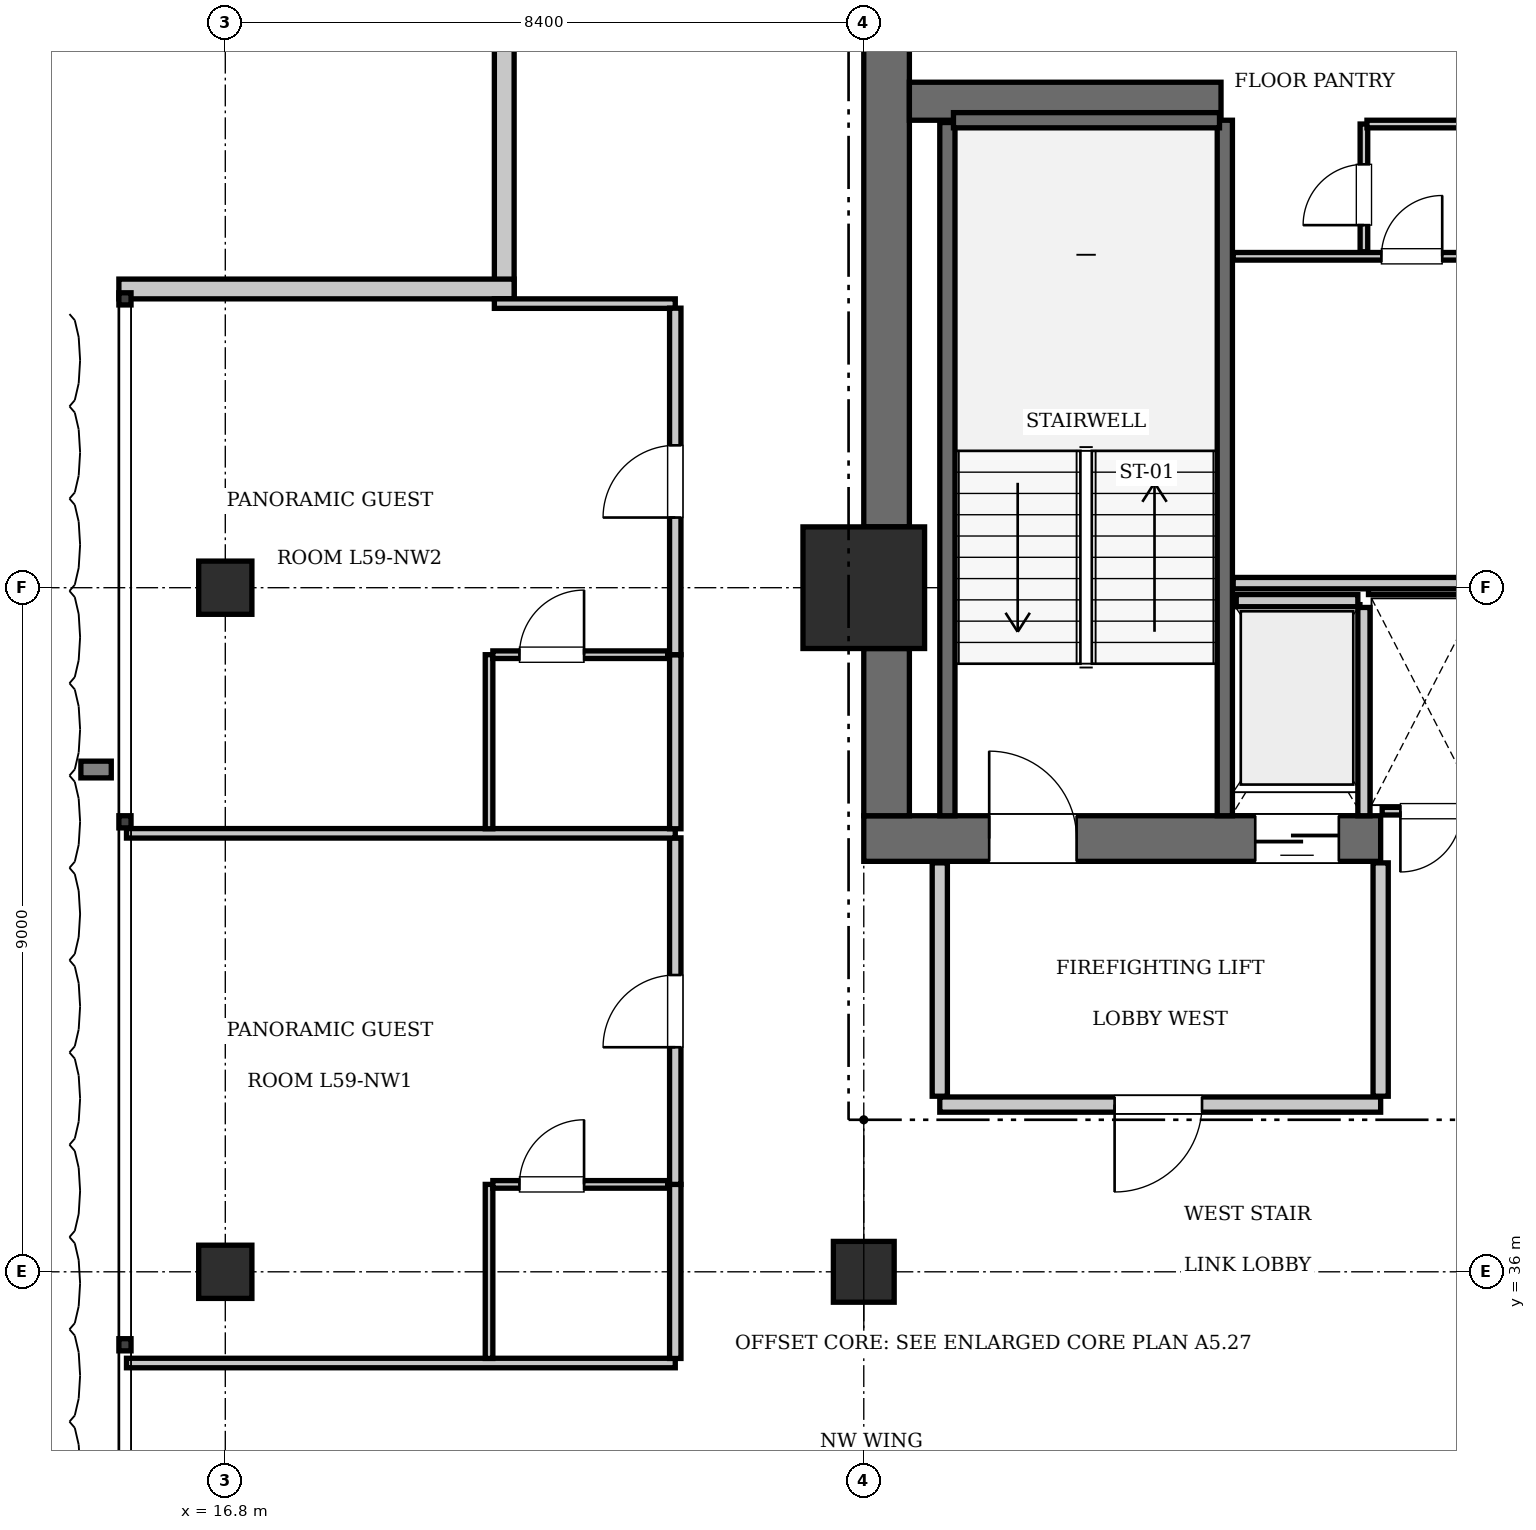
"""IFC4 building model, lengths in metres.
Left out: names, types, materials, properties, quantities, classifications, styles, units other than length and angle.
Written with IfcOpenShell. Run it as: python <this file> out.ifc"""

import sys

from ifc_helpers import new_model, si_unit, direction, frame, frame_2d, origin, origin_2d, place, context, subcontext, project, spatial, rectangle, extrude, element, fill, save


model = new_model("IFC4")
c1 = context("Model", 3, precision=1e-05, world=origin(), true_north=direction((0.0, 1.0)))
c2 = subcontext(c1, "Body", "Model", "MODEL_VIEW")
j1 = project(units=[si_unit("LENGTHUNIT", "METRE"), si_unit("PLANEANGLEUNIT", "RADIAN")], contexts=[c1])
p1 = place(None, origin())
s1 = spatial("IfcSite", under=j1, at=p1, CompositionType="ELEMENT")
p2 = place(p1, origin())
s2 = spatial("IfcBuilding", under=s1, at=p2, CompositionType="ELEMENT")
p3 = place(p2, frame((0.0, 0.0, 243.25)))
s3 = spatial("IfcBuildingStorey", under=s2, at=p3, CompositionType="ELEMENT", Elevation=243.25)
p4 = place(p3, frame((25.2, 45.0, 0.0), z_axis=(0.0, 0.0, 1.0), x_axis=(1.0, 0.0, 0.0)))
e1 = element("IfcColumn", 1, at=p4, inside=s3, PredefinedType="COLUMN", context=c2, shape_type="SweptSolid", body=[
    extrude(rectangle(XDim=1.6, YDim=1.6, at=origin_2d()), origin(), (0.0, 0.0, 1.0), 3.85),
])
p5 = place(p3, frame((25.2, 41.7, 0.0), z_axis=(0.0, 0.0, 1.0), x_axis=(1.0, 0.0, 0.0)))
e2 = element("IfcWall", 2, at=p5, inside=s3, PredefinedType="SHEAR", context=c2, shape_type="SweptSolid", body=[
    extrude(rectangle(XDim=6.8, YDim=0.6, at=frame_2d((3.4, 0.0))), origin(), (0.0, 0.0, 1.0), 3.85),
])
p6 = place(p5, frame((1.65, 0.0, 0.0)))
e3 = element("IfcOpeningElement", 3, at=p6, cuts=e2, PredefinedType="OPENING", context=c2, shape_type="SweptSolid", body=[
    extrude(rectangle(XDim=1.15, YDim=2.15, at=frame_2d((0.575, 1.075))), frame((0.0, 0.31, 0.0), z_axis=(0.0, -1.0, 0.0), x_axis=(1.0, 0.0, 0.0)), (0.0, 0.0, 1.0), 0.62),
])
p7 = place(p5, frame((5.15, 0.0, 0.0)))
e4 = element("IfcOpeningElement", 4, at=p7, cuts=e2, PredefinedType="OPENING", context=c2, shape_type="SweptSolid", body=[
    extrude(rectangle(XDim=1.1, YDim=2.2, at=frame_2d((0.55, 1.1))), frame((0.0, 0.31, 0.0), z_axis=(0.0, -1.0, 0.0), x_axis=(1.0, 0.0, 0.0)), (0.0, 0.0, 1.0), 0.62),
])
p8 = place(p3, frame((25.5, 42.0, 0.0), z_axis=(0.0, 0.0, 1.0), x_axis=(0.0, 1.0, 0.0)))
e5 = element("IfcWall", 5, at=p8, inside=s3, PredefinedType="SHEAR", context=c2, shape_type="SweptSolid", body=[
    extrude(rectangle(XDim=2.2, YDim=0.6, at=frame_2d((1.1, 0.0))), origin(), (0.0, 0.0, 1.0), 3.85),
])
p9 = place(p3, frame((25.5, 45.8, 0.0), z_axis=(0.0, 0.0, 1.0), x_axis=(0.0, 1.0, 0.0)))
e6 = element("IfcWall", 6, at=p9, inside=s3, PredefinedType="SHEAR", context=c2, shape_type="SweptSolid", body=[
    extrude(rectangle(XDim=7.6, YDim=0.6, at=frame_2d((3.8, 0.0))), origin(), (0.0, 0.0, 1.0), 3.85),
])
p10 = place(p3, frame((25.8, 51.4, 0.0), z_axis=(0.0, 0.0, 1.0), x_axis=(1.0, 0.0, 0.0)))
e7 = element("IfcWall", 7, at=p10, inside=s3, PredefinedType="SHEAR", context=c2, shape_type="SweptSolid", body=[
    extrude(rectangle(XDim=4.1, YDim=0.5, at=frame_2d((2.05, 0.0))), origin(), (0.0, 0.0, 1.0), 3.85),
])
p11 = place(p3, frame((25.2, 36.0, 0.0), z_axis=(0.0, 0.0, 1.0), x_axis=(1.0, 0.0, 0.0)))
e8 = element("IfcColumn", 8, at=p11, inside=s3, PredefinedType="COLUMN", context=c2, shape_type="SweptSolid", body=[
    extrude(rectangle(XDim=0.8, YDim=0.8, at=origin_2d()), origin(), (0.0, 0.0, 1.0), 3.85),
])
for number, where, z_axis, x_axis in (
    (9, (16.8, 36.0, 0.0), (0.0, 0.0, 1.0), (1.0, 0.0, 0.0)),
    (10, (16.8, 45.0, 0.0), (0.0, 0.0, 1.0), (1.0, 0.0, 0.0)),
):
    element("IfcColumn", number, at=place(p3, frame(where, z_axis=z_axis, x_axis=x_axis)), inside=s3, PredefinedType="COLUMN", context=c2, shape_type="SweptSolid", body=[
        extrude(rectangle(XDim=0.7, YDim=0.7, at=origin_2d()), origin(), (0.0, 0.0, 1.0), 3.85),
    ])
p12 = place(p3, frame((29.95, 42.0, 0.0), z_axis=(0.0, 0.0, 1.0), x_axis=(0.0, 1.0, 0.0)))
e11 = element("IfcWall", 11, at=p12, inside=s3, PredefinedType="SOLIDWALL", context=c2, shape_type="SweptSolid", body=[
    extrude(rectangle(XDim=9.15, YDim=0.2, at=frame_2d((4.575, 0.0))), origin(), (0.0, 0.0, 1.0), 3.61),
])
p13 = place(p3, frame((26.3, 42.0, 0.0), z_axis=(0.0, 0.0, 1.0), x_axis=(0.0, 1.0, 0.0)))
e12 = element("IfcWall", 12, at=p13, inside=s3, PredefinedType="SOLIDWALL", context=c2, shape_type="SweptSolid", body=[
    extrude(rectangle(XDim=9.12, YDim=0.2, at=frame_2d((4.56, 0.0))), origin(), (0.0, 0.0, 1.0), 3.61),
])
p14 = place(p3, frame((26.38, 51.15, 0.0), z_axis=(0.0, 0.0, 1.0), x_axis=(1.0, 0.0, 0.0)))
e13 = element("IfcWall", 13, at=p14, inside=s3, PredefinedType="SOLIDWALL", context=c2, shape_type="SweptSolid", body=[
    extrude(rectangle(XDim=3.5, YDim=0.2, at=frame_2d((1.75, 0.0))), origin(), (0.0, 0.0, 1.0), 3.61),
])
p15 = place(p3, frame((30.1, 44.83, 0.0), z_axis=(0.0, 0.0, 1.0), x_axis=(1.0, 0.0, 0.0)))
e14 = element("IfcWall", 14, at=p15, inside=s3, PredefinedType="SOLIDWALL", context=c2, shape_type="SweptSolid", body=[
    extrude(rectangle(XDim=1.6, YDim=0.16, at=frame_2d((0.8, 0.0))), origin(), (0.0, 0.0, 1.0), 3.61),
])
p16 = place(p3, frame((31.78, 42.0, 0.0), z_axis=(0.0, 0.0, 1.0), x_axis=(0.0, 1.0, 0.0)))
e15 = element("IfcWall", 15, at=p16, inside=s3, PredefinedType="SOLIDWALL", context=c2, shape_type="SweptSolid", body=[
    extrude(rectangle(XDim=2.74, YDim=0.16, at=frame_2d((1.37, 0.0))), origin(), (0.0, 0.0, 1.0), 3.61),
])
p17 = place(p3, frame((20.47, 48.8, 0.0), z_axis=(0.0, 0.0, 1.0), x_axis=(0.0, 1.0, 0.0)))
e16 = element("IfcWall", 16, at=p17, inside=s3, PredefinedType="SOLIDWALL", context=c2, shape_type="SweptSolid", body=[
    extrude(rectangle(XDim=5.2, YDim=0.26, at=frame_2d((2.6, 0.0))), origin(), (0.0, 0.0, 1.0), 3.61),
])
p18 = place(p3, frame((15.4, 48.93, 0.0), z_axis=(0.0, 0.0, 1.0), x_axis=(1.0, 0.0, 0.0)))
e17 = element("IfcWall", 17, at=p18, inside=s3, PredefinedType="SOLIDWALL", context=c2, shape_type="SweptSolid", body=[
    extrude(rectangle(XDim=5.2, YDim=0.26, at=frame_2d((2.6, 0.0))), origin(), (0.0, 0.0, 1.0), 3.61),
])
p19 = place(p3, frame((26.2, 38.2, 0.0), z_axis=(0.0, 0.0, 1.0), x_axis=(1.0, 0.0, 0.0)))
e18 = element("IfcWall", 18, at=p19, inside=s3, PredefinedType="PARTITIONING", context=c2, shape_type="SweptSolid", body=[
    extrude(rectangle(XDim=5.8, YDim=0.2, at=frame_2d((2.9, 0.0))), origin(), (0.0, 0.0, 1.0), 3.61),
])
p20 = place(p19, frame((2.3, 0.0, 0.0)))
e19 = element("IfcOpeningElement", 19, at=p20, cuts=e18, PredefinedType="OPENING", context=c2, shape_type="SweptSolid", body=[
    extrude(rectangle(XDim=1.15, YDim=2.15, at=frame_2d((0.575, 1.075))), frame((0.0, 0.11, 0.0), z_axis=(0.0, -1.0, 0.0), x_axis=(1.0, 0.0, 0.0)), (0.0, 0.0, 1.0), 0.22),
])
for number, where, z_axis, x_axis in (
    (20, (26.2, 38.31, 0.0), (0.0, 0.0, 1.0), (0.0, 1.0, 0.0)),
    (21, (32.0, 38.31, 0.0), (0.0, 0.0, 1.0), (0.0, 1.0, 0.0)),
):
    element("IfcWall", number, at=place(p3, frame(where, z_axis=z_axis, x_axis=x_axis)), inside=s3, PredefinedType="PARTITIONING", context=c2, shape_type="SweptSolid", body=[
        extrude(rectangle(XDim=3.07, YDim=0.2, at=frame_2d((1.535, 0.0))), origin(), (0.0, 0.0, 1.0), 3.61),
    ])
p21 = place(p3, frame((32.02, 42.06, 0.0), z_axis=(0.0, 0.0, 1.0), x_axis=(1.0, 0.0, 0.0)))
e22 = element("IfcWall", 22, at=p21, inside=s3, PredefinedType="PARTITIONING", context=c2, shape_type="SweptSolid", body=[
    extrude(rectangle(XDim=1.32, YDim=0.1, at=frame_2d((0.66, 0.0))), origin(), (0.0, 0.0, 1.0), 3.61),
])
p22 = place(p21, frame((0.24, 0.0, 0.0)))
e23 = element("IfcOpeningElement", 23, at=p22, cuts=e22, PredefinedType="OPENING", context=c2, shape_type="SweptSolid", body=[
    extrude(rectangle(XDim=0.8, YDim=2.05, at=frame_2d((0.4, 1.025))), frame((0.0, 0.06, 0.0), z_axis=(0.0, -1.0, 0.0), x_axis=(1.0, 0.0, 0.0)), (0.0, 0.0, 1.0), 0.12),
])
p23 = place(p3, frame((31.84, 44.96, 0.0), z_axis=(0.0, 0.0, 1.0), x_axis=(1.0, 0.0, 0.0)))
e24 = element("IfcWall", 24, at=p23, inside=s3, PredefinedType="PARTITIONING", context=c2, shape_type="SweptSolid", body=[
    extrude(rectangle(XDim=1.48, YDim=0.1, at=frame_2d((0.74, 0.0))), origin(), (0.0, 0.0, 1.0), 3.61),
])
p24 = place(p3, frame((30.06, 45.06, 0.0), z_axis=(0.0, 0.0, 1.0), x_axis=(1.0, 0.0, 0.0)))
e25 = element("IfcWall", 25, at=p24, inside=s3, PredefinedType="PARTITIONING", context=c2, shape_type="SweptSolid", body=[
    extrude(rectangle(XDim=3.18, YDim=0.15, at=frame_2d((1.59, 0.0))), origin(), (0.0, 0.0, 1.0), 3.61),
])
p25 = place(p3, frame((30.06, 49.36, 0.0), z_axis=(0.0, 0.0, 1.0), x_axis=(1.0, 0.0, 0.0)))
e26 = element("IfcWall", 26, at=p25, inside=s3, PredefinedType="PARTITIONING", context=c2, shape_type="SweptSolid", body=[
    extrude(rectangle(XDim=3.18, YDim=0.1, at=frame_2d((1.59, 0.0))), origin(), (0.0, 0.0, 1.0), 3.61),
])
p26 = place(p25, frame((1.95, 0.0, 0.0)))
e27 = element("IfcOpeningElement", 27, at=p26, cuts=e26, PredefinedType="OPENING", context=c2, shape_type="SweptSolid", body=[
    extrude(rectangle(XDim=0.8, YDim=2.05, at=frame_2d((0.4, 1.025))), frame((0.0, 0.06, 0.0), z_axis=(0.0, -1.0, 0.0), x_axis=(1.0, 0.0, 0.0)), (0.0, 0.0, 1.0), 0.12),
])
p27 = place(p3, frame((31.78, 49.42, 0.0), z_axis=(0.0, 0.0, 1.0), x_axis=(0.0, 1.0, 0.0)))
e28 = element("IfcWall", 28, at=p27, inside=s3, PredefinedType="PARTITIONING", context=c2, shape_type="SweptSolid", body=[
    extrude(rectangle(XDim=1.68, YDim=0.1, at=frame_2d((0.84, 0.0))), origin(), (0.0, 0.0, 1.0), 3.61),
])
p28 = place(p27, frame((0.35, 0.0, 0.0)))
e29 = element("IfcOpeningElement", 29, at=p28, cuts=e28, PredefinedType="OPENING", context=c2, shape_type="SweptSolid", body=[
    extrude(rectangle(XDim=0.8, YDim=2.05, at=frame_2d((0.4, 1.025))), frame((0.0, 0.06, 0.0), z_axis=(0.0, -1.0, 0.0), x_axis=(1.0, 0.0, 0.0)), (0.0, 0.0, 1.0), 0.12),
])
p29 = place(p3, frame((31.82, 51.1, 0.0), z_axis=(0.0, 0.0, 1.0), x_axis=(1.0, 0.0, 0.0)))
e30 = element("IfcWall", 30, at=p29, inside=s3, PredefinedType="PARTITIONING", context=c2, shape_type="SweptSolid", body=[
    extrude(rectangle(XDim=1.42, YDim=0.1, at=frame_2d((0.71, 0.0))), origin(), (0.0, 0.0, 1.0), 3.61),
])
p30 = place(p3, frame((15.5, 34.8, 0.0), z_axis=(0.0, 0.0, 1.0), x_axis=(1.0, 0.0, 0.0)))
e31 = element("IfcWall", 31, at=p30, inside=s3, PredefinedType="PARTITIONING", context=c2, shape_type="SweptSolid", body=[
    extrude(rectangle(XDim=7.22, YDim=0.125, at=frame_2d((3.61, 0.0))), origin(), (0.0, 0.0, 1.0), 3.61),
])
p31 = place(p3, frame((20.34, 48.738, 0.0), z_axis=(0.0, 0.0, 1.0), x_axis=(1.0, 0.0, 0.0)))
e32 = element("IfcWall", 32, at=p31, inside=s3, PredefinedType="PARTITIONING", context=c2, shape_type="SweptSolid", body=[
    extrude(rectangle(XDim=2.38, YDim=0.125, at=frame_2d((1.19, 0.0))), origin(), (0.0, 0.0, 1.0), 3.61),
])
p32 = place(p3, frame((22.72, 34.86, 0.0), z_axis=(0.0, 0.0, 1.0), x_axis=(0.0, 1.0, 0.0)))
e33 = element("IfcWall", 33, at=p32, inside=s3, PredefinedType="PARTITIONING", context=c2, shape_type="SweptSolid", body=[
    extrude(rectangle(XDim=2.29, YDim=0.15, at=frame_2d((1.145, 0.0))), origin(), (0.0, 0.0, 1.0), 3.61),
])
p33 = place(p3, frame((22.72, 37.15, 0.0), z_axis=(0.0, 0.0, 1.0), x_axis=(0.0, 1.0, 0.0)))
e34 = element("IfcWall", 34, at=p33, inside=s3, PredefinedType="PARTITIONING", context=c2, shape_type="SweptSolid", body=[
    extrude(rectangle(XDim=4.559, YDim=0.15, at=frame_2d((2.279, 0.0))), origin(), (0.0, 0.0, 1.0), 3.61),
])
p34 = place(p33, frame((1.804, 0.0, 0.0)))
e35 = element("IfcOpeningElement", 35, at=p34, cuts=e34, PredefinedType="OPENING", context=c2, shape_type="SweptSolid", body=[
    extrude(rectangle(XDim=0.95, YDim=2.15, at=frame_2d((0.475, 1.075))), frame((0.0, 0.085, 0.0), z_axis=(0.0, -1.0, 0.0), x_axis=(1.0, 0.0, 0.0)), (0.0, 0.0, 1.0), 0.17),
])
p35 = place(p3, frame((20.27, 34.86, 0.0), z_axis=(0.0, 0.0, 1.0), x_axis=(0.0, 1.0, 0.0)))
e36 = element("IfcWall", 36, at=p35, inside=s3, PredefinedType="PARTITIONING", context=c2, shape_type="SweptSolid", body=[
    extrude(rectangle(XDim=2.29, YDim=0.1, at=frame_2d((1.145, 0.0))), origin(), (0.0, 0.0, 1.0), 3.61),
])
p36 = place(p3, frame((20.32, 37.15, 0.0), z_axis=(0.0, 0.0, 1.0), x_axis=(1.0, 0.0, 0.0)))
e37 = element("IfcWall", 37, at=p36, inside=s3, PredefinedType="PARTITIONING", context=c2, shape_type="SweptSolid", body=[
    extrude(rectangle(XDim=2.3, YDim=0.1, at=frame_2d((1.15, 0.0))), origin(), (0.0, 0.0, 1.0), 3.61),
])
p37 = place(p36, frame((0.35, 0.0, 0.0)))
e38 = element("IfcOpeningElement", 38, at=p37, cuts=e37, PredefinedType="OPENING", context=c2, shape_type="SweptSolid", body=[
    extrude(rectangle(XDim=0.85, YDim=2.1, at=frame_2d((0.425, 1.05))), frame((0.0, 0.06, 0.0), z_axis=(0.0, -1.0, 0.0), x_axis=(1.0, 0.0, 0.0)), (0.0, 0.0, 1.0), 0.12),
])
p38 = place(p3, frame((15.5, 41.769, 0.0), z_axis=(0.0, 0.0, 1.0), x_axis=(1.0, 0.0, 0.0)))
e39 = element("IfcWall", 39, at=p38, inside=s3, PredefinedType="PARTITIONING", context=c2, shape_type="SweptSolid", body=[
    extrude(rectangle(XDim=7.22, YDim=0.125, at=frame_2d((3.61, 0.0))), origin(), (0.0, 0.0, 1.0), 3.61),
])
p39 = place(p3, frame((22.72, 41.829, 0.0), z_axis=(0.0, 0.0, 1.0), x_axis=(0.0, 1.0, 0.0)))
e40 = element("IfcWall", 40, at=p39, inside=s3, PredefinedType="PARTITIONING", context=c2, shape_type="SweptSolid", body=[
    extrude(rectangle(XDim=2.29, YDim=0.15, at=frame_2d((1.145, 0.0))), origin(), (0.0, 0.0, 1.0), 3.61),
])
p40 = place(p3, frame((22.72, 44.119, 0.0), z_axis=(0.0, 0.0, 1.0), x_axis=(0.0, 1.0, 0.0)))
e41 = element("IfcWall", 41, at=p40, inside=s3, PredefinedType="PARTITIONING", context=c2, shape_type="SweptSolid", body=[
    extrude(rectangle(XDim=4.559, YDim=0.15, at=frame_2d((2.279, 0.0))), origin(), (0.0, 0.0, 1.0), 3.61),
])
p41 = place(p40, frame((1.804, 0.0, 0.0)))
e42 = element("IfcOpeningElement", 42, at=p41, cuts=e41, PredefinedType="OPENING", context=c2, shape_type="SweptSolid", body=[
    extrude(rectangle(XDim=0.95, YDim=2.15, at=frame_2d((0.475, 1.075))), frame((0.0, 0.085, 0.0), z_axis=(0.0, -1.0, 0.0), x_axis=(1.0, 0.0, 0.0)), (0.0, 0.0, 1.0), 0.17),
])
p42 = place(p3, frame((20.27, 41.829, 0.0), z_axis=(0.0, 0.0, 1.0), x_axis=(0.0, 1.0, 0.0)))
e43 = element("IfcWall", 43, at=p42, inside=s3, PredefinedType="PARTITIONING", context=c2, shape_type="SweptSolid", body=[
    extrude(rectangle(XDim=2.29, YDim=0.1, at=frame_2d((1.145, 0.0))), origin(), (0.0, 0.0, 1.0), 3.61),
])
p43 = place(p3, frame((20.32, 44.119, 0.0), z_axis=(0.0, 0.0, 1.0), x_axis=(1.0, 0.0, 0.0)))
e44 = element("IfcWall", 44, at=p43, inside=s3, PredefinedType="PARTITIONING", context=c2, shape_type="SweptSolid", body=[
    extrude(rectangle(XDim=2.3, YDim=0.1, at=frame_2d((1.15, 0.0))), origin(), (0.0, 0.0, 1.0), 3.61),
])
p44 = place(p43, frame((0.35, 0.0, 0.0)))
e45 = element("IfcOpeningElement", 45, at=p44, cuts=e44, PredefinedType="OPENING", context=c2, shape_type="SweptSolid", body=[
    extrude(rectangle(XDim=0.85, YDim=2.1, at=frame_2d((0.425, 1.05))), frame((0.0, 0.06, 0.0), z_axis=(0.0, -1.0, 0.0), x_axis=(1.0, 0.0, 0.0)), (0.0, 0.0, 1.0), 0.12),
])
p45 = place(p6, origin())
e46 = element("IfcDoor", 46, at=p45, inside=s3, OperationType="SINGLE_SWING_LEFT", PredefinedType="DOOR", context=c2, shape_type="SweptSolid", body=[
    extrude(rectangle(XDim=1.15, YDim=2.15, at=frame_2d((0.575, 1.075))), frame((0.0, 0.025, 0.0), z_axis=(0.0, -1.0, 0.0), x_axis=(1.0, 0.0, 0.0)), (0.0, 0.0, 1.0), 0.05),
])
fill(e3, e46)
p46 = place(p7, frame((1.1, 0.0, 0.0), z_axis=(0.0, 0.0, 1.0), x_axis=(-1.0, 0.0, 0.0)))
e47 = element("IfcDoor", 47, at=p46, inside=s3, OperationType="SLIDING_TO_LEFT", PredefinedType="DOOR", context=c2, shape_type="SweptSolid", body=[
    extrude(rectangle(XDim=1.1, YDim=2.2, at=frame_2d((0.55, 1.1))), frame((0.0, 0.025, 0.0), z_axis=(0.0, -1.0, 0.0), x_axis=(1.0, 0.0, 0.0)), (0.0, 0.0, 1.0), 0.05),
])
fill(e4, e47)
p47 = place(p20, frame((1.15, 0.0, 0.0), z_axis=(0.0, 0.0, 1.0), x_axis=(-1.0, 0.0, 0.0)))
e48 = element("IfcDoor", 48, at=p47, inside=s3, OperationType="SINGLE_SWING_RIGHT", PredefinedType="DOOR", context=c2, shape_type="SweptSolid", body=[
    extrude(rectangle(XDim=1.15, YDim=2.15, at=frame_2d((0.575, 1.075))), frame((0.0, 0.025, 0.0), z_axis=(0.0, -1.0, 0.0), x_axis=(1.0, 0.0, 0.0)), (0.0, 0.0, 1.0), 0.05),
])
fill(e19, e48)
p48 = place(p22, frame((0.8, 0.0, 0.0), z_axis=(0.0, 0.0, 1.0), x_axis=(-1.0, 0.0, 0.0)))
e49 = element("IfcDoor", 49, at=p48, inside=s3, OperationType="SINGLE_SWING_RIGHT", PredefinedType="DOOR", context=c2, shape_type="SweptSolid", body=[
    extrude(rectangle(XDim=0.8, YDim=2.05, at=frame_2d((0.4, 1.025))), frame((0.0, 0.025, 0.0), z_axis=(0.0, -1.0, 0.0), x_axis=(1.0, 0.0, 0.0)), (0.0, 0.0, 1.0), 0.05),
])
fill(e23, e49)
p49 = place(p26, origin())
e50 = element("IfcDoor", 50, at=p49, inside=s3, OperationType="SINGLE_SWING_RIGHT", PredefinedType="DOOR", context=c2, shape_type="SweptSolid", body=[
    extrude(rectangle(XDim=0.8, YDim=2.05, at=frame_2d((0.4, 1.025))), frame((0.0, 0.025, 0.0), z_axis=(0.0, -1.0, 0.0), x_axis=(1.0, 0.0, 0.0)), (0.0, 0.0, 1.0), 0.05),
])
fill(e27, e50)
p50 = place(p28, origin())
e51 = element("IfcDoor", 51, at=p50, inside=s3, OperationType="SINGLE_SWING_LEFT", PredefinedType="DOOR", context=c2, shape_type="SweptSolid", body=[
    extrude(rectangle(XDim=0.8, YDim=2.05, at=frame_2d((0.4, 1.025))), frame((0.0, 0.025, 0.0), z_axis=(0.0, -1.0, 0.0), x_axis=(1.0, 0.0, 0.0)), (0.0, 0.0, 1.0), 0.05),
])
fill(e29, e51)
p51 = place(p37, origin())
e52 = element("IfcDoor", 52, at=p51, inside=s3, OperationType="SINGLE_SWING_RIGHT", PredefinedType="DOOR", context=c2, shape_type="SweptSolid", body=[
    extrude(rectangle(XDim=0.85, YDim=2.1, at=frame_2d((0.425, 1.05))), frame((0.0, 0.025, 0.0), z_axis=(0.0, -1.0, 0.0), x_axis=(1.0, 0.0, 0.0)), (0.0, 0.0, 1.0), 0.05),
])
fill(e38, e52)
p52 = place(p34, origin())
e53 = element("IfcDoor", 53, at=p52, inside=s3, OperationType="SINGLE_SWING_LEFT", PredefinedType="DOOR", context=c2, shape_type="SweptSolid", body=[
    extrude(rectangle(XDim=0.95, YDim=2.15, at=frame_2d((0.475, 1.075))), frame((0.0, 0.025, 0.0), z_axis=(0.0, -1.0, 0.0), x_axis=(1.0, 0.0, 0.0)), (0.0, 0.0, 1.0), 0.05),
])
fill(e35, e53)
p53 = place(p44, origin())
e54 = element("IfcDoor", 54, at=p53, inside=s3, OperationType="SINGLE_SWING_RIGHT", PredefinedType="DOOR", context=c2, shape_type="SweptSolid", body=[
    extrude(rectangle(XDim=0.85, YDim=2.1, at=frame_2d((0.425, 1.05))), frame((0.0, 0.025, 0.0), z_axis=(0.0, -1.0, 0.0), x_axis=(1.0, 0.0, 0.0)), (0.0, 0.0, 1.0), 0.05),
])
fill(e45, e54)
p54 = place(p41, origin())
e55 = element("IfcDoor", 55, at=p54, inside=s3, OperationType="SINGLE_SWING_LEFT", PredefinedType="DOOR", context=c2, shape_type="SweptSolid", body=[
    extrude(rectangle(XDim=0.95, YDim=2.15, at=frame_2d((0.475, 1.075))), frame((0.0, 0.025, 0.0), z_axis=(0.0, -1.0, 0.0), x_axis=(1.0, 0.0, 0.0)), (0.0, 0.0, 1.0), 0.05),
])
fill(e42, e55)
save(model, sys.argv[1])
